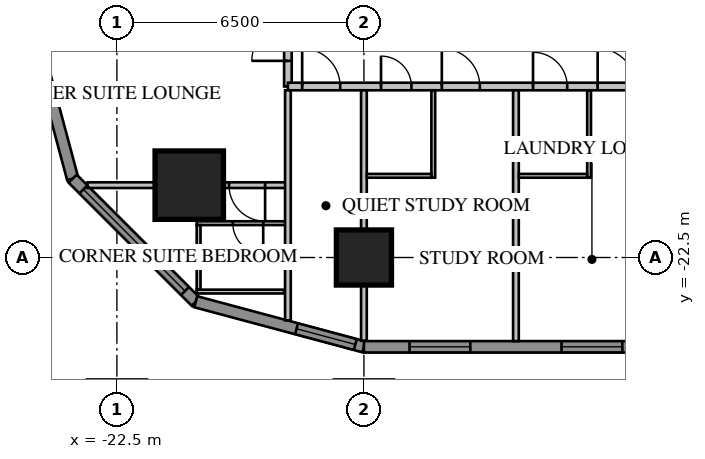
"""IFC4 building model, lengths in metres.
Left out: names, types, materials, properties, quantities, classifications, styles, units other than length and angle.
Written with IfcOpenShell. Run it as: python <this file> out.ifc"""

import sys

from ifc_helpers import new_model, si_unit, direction, frame, frame_2d, origin, origin_2d, place, context, subcontext, project, spatial, rectangle, extrude, element, fill, save


model = new_model("IFC4")
c1 = context("Model", 3, precision=1e-05, world=origin(), true_north=direction((0.0, 1.0)))
c2 = subcontext(c1, "Body", "Model", "MODEL_VIEW")
j1 = project(units=[si_unit("LENGTHUNIT", "METRE"), si_unit("PLANEANGLEUNIT", "RADIAN")], contexts=[c1])
p1 = place(None, origin())
s1 = spatial("IfcSite", under=j1, at=p1, CompositionType="ELEMENT")
p2 = place(p1, origin())
s2 = spatial("IfcBuilding", under=s1, at=p2, CompositionType="ELEMENT")
p3 = place(p2, frame((0.0, 0.0, 50.65)))
s3 = spatial("IfcBuildingStorey", under=s2, at=p3, CompositionType="ELEMENT", Elevation=50.65)
p4 = place(p3, frame((-20.596, -20.596, 0.0), z_axis=(0.0, 0.0, 1.0), x_axis=(1.0, 0.0, 0.0)))
e1 = element("IfcColumn", 1, at=p4, inside=s3, PredefinedType="COLUMN", context=c2, shape_type="SweptSolid", body=[
    extrude(rectangle(XDim=1.8, YDim=1.8, at=origin_2d()), origin(), (0.0, 0.0, 1.0), 3.413),
])
p5 = place(p3, frame((-16.0, -22.5, 0.0), z_axis=(0.0, 0.0, 1.0), x_axis=(1.0, 0.0, 0.0)))
e2 = element("IfcColumn", 2, at=p5, inside=s3, PredefinedType="COLUMN", context=c2, shape_type="SweptSolid", body=[
    extrude(rectangle(XDim=1.45, YDim=1.45, at=origin_2d()), origin(), (0.0, 0.0, 1.0), 3.413),
])
p6 = place(p3, frame((-24.85, -16.0, 0.0), z_axis=(0.0, 0.0, 1.0), x_axis=(0.258839972501, -0.965920218567, 0.0)))
e3 = element("IfcWall", 3, at=p6, inside=s3, PredefinedType="SOLIDWALL", context=c2, shape_type="SweptSolid", body=[
    extrude(rectangle(XDim=4.581, YDim=0.3, at=frame_2d((2.291, 0.0))), origin(), (0.0, 0.0, 1.0), 3.65),
])
p7 = place(p3, frame((-23.664, -20.425, 0.0), z_axis=(0.0, 0.0, 1.0), x_axis=(0.707106781187, -0.707106781187, 0.0)))
e4 = element("IfcWall", 4, at=p7, inside=s3, PredefinedType="SOLIDWALL", context=c2, shape_type="SweptSolid", body=[
    extrude(rectangle(XDim=4.581, YDim=0.3, at=frame_2d((2.291, 0.0))), origin(), (0.0, 0.0, 1.0), 3.65),
])
p8 = place(p7, frame((0.4, 0.0, 0.75)))
e5 = element("IfcOpeningElement", 5, at=p8, cuts=e4, PredefinedType="OPENING", context=c2, shape_type="SweptSolid", body=[
    extrude(rectangle(XDim=3.781, YDim=1.8, at=frame_2d((1.891, 0.9))), frame((0.0, 0.17, 0.0), z_axis=(0.0, -1.0, 0.0), x_axis=(1.0, 0.0, 0.0)), (0.0, 0.0, 1.0), 0.34),
])
p9 = place(p3, frame((-20.425, -23.664, 0.0), z_axis=(0.0, 0.0, 1.0), x_axis=(0.965920218567, -0.258839972501, 0.0)))
e6 = element("IfcWall", 6, at=p9, inside=s3, PredefinedType="SOLIDWALL", context=c2, shape_type="SweptSolid", body=[
    extrude(rectangle(XDim=4.581, YDim=0.3, at=frame_2d((2.291, 0.0))), origin(), (0.0, 0.0, 1.0), 3.65),
])
p10 = place(p9, frame((2.746, 0.0, 0.75)))
e7 = element("IfcOpeningElement", 7, at=p10, cuts=e6, PredefinedType="OPENING", context=c2, shape_type="SweptSolid", body=[
    extrude(rectangle(XDim=1.6, YDim=1.8, at=frame_2d((0.8, 0.9))), frame((0.0, 0.17, 0.0), z_axis=(0.0, -1.0, 0.0), x_axis=(1.0, 0.0, 0.0)), (0.0, 0.0, 1.0), 0.34),
])
p11 = place(p3, frame((-16.0, -24.85, 0.0), z_axis=(0.0, 0.0, 1.0), x_axis=(1.0, 0.0, 0.0)))
e8 = element("IfcWall", 8, at=p11, inside=s3, PredefinedType="SOLIDWALL", context=c2, shape_type="SweptSolid", body=[
    extrude(rectangle(XDim=32.0, YDim=0.3, at=frame_2d((16.0, 0.0))), origin(), (0.0, 0.0, 1.0), 3.65),
])
p12 = place(p11, frame((1.2, 0.0, 0.75)))
e9 = element("IfcOpeningElement", 9, at=p12, cuts=e8, PredefinedType="OPENING", context=c2, shape_type="SweptSolid", body=[
    extrude(rectangle(XDim=1.6, YDim=1.8, at=frame_2d((0.8, 0.9))), frame((0.0, 0.17, 0.0), z_axis=(0.0, -1.0, 0.0), x_axis=(1.0, 0.0, 0.0)), (0.0, 0.0, 1.0), 0.34),
])
p13 = place(p11, frame((5.2, 0.0, 0.75)))
e10 = element("IfcOpeningElement", 10, at=p13, cuts=e8, PredefinedType="OPENING", context=c2, shape_type="SweptSolid", body=[
    extrude(rectangle(XDim=1.6, YDim=1.8, at=frame_2d((0.8, 0.9))), frame((0.0, 0.17, 0.0), z_axis=(0.0, -1.0, 0.0), x_axis=(1.0, 0.0, 0.0)), (0.0, 0.0, 1.0), 0.34),
])
p14 = place(p11, frame((17.2, 0.0, 0.75)))
e11 = element("IfcOpeningElement", 11, at=p14, cuts=e8, PredefinedType="OPENING", context=c2, shape_type="SweptSolid", body=[
    extrude(rectangle(XDim=1.6, YDim=1.8, at=frame_2d((0.8, 0.9))), frame((0.0, 0.17, 0.0), z_axis=(0.0, -1.0, 0.0), x_axis=(1.0, 0.0, 0.0)), (0.0, 0.0, 1.0), 0.34),
])
p15 = place(p11, frame((21.2, 0.0, 0.75)))
e12 = element("IfcOpeningElement", 12, at=p15, cuts=e8, PredefinedType="OPENING", context=c2, shape_type="SweptSolid", body=[
    extrude(rectangle(XDim=1.6, YDim=1.8, at=frame_2d((0.8, 0.9))), frame((0.0, 0.17, 0.0), z_axis=(0.0, -1.0, 0.0), x_axis=(1.0, 0.0, 0.0)), (0.0, 0.0, 1.0), 0.34),
])
p16 = place(p11, frame((25.2, 0.0, 0.75)))
e13 = element("IfcOpeningElement", 13, at=p16, cuts=e8, PredefinedType="OPENING", context=c2, shape_type="SweptSolid", body=[
    extrude(rectangle(XDim=1.6, YDim=1.8, at=frame_2d((0.8, 0.9))), frame((0.0, 0.17, 0.0), z_axis=(0.0, -1.0, 0.0), x_axis=(1.0, 0.0, 0.0)), (0.0, 0.0, 1.0), 0.34),
])
p17 = place(p11, frame((29.2, 0.0, 0.75)))
e14 = element("IfcOpeningElement", 14, at=p17, cuts=e8, PredefinedType="OPENING", context=c2, shape_type="SweptSolid", body=[
    extrude(rectangle(XDim=1.6, YDim=1.8, at=frame_2d((0.8, 0.9))), frame((0.0, 0.17, 0.0), z_axis=(0.0, -1.0, 0.0), x_axis=(1.0, 0.0, 0.0)), (0.0, 0.0, 1.0), 0.34),
])
p18 = place(p11, frame((8.8, 0.0, 0.75)))
e15 = element("IfcOpeningElement", 15, at=p18, cuts=e8, PredefinedType="OPENING", context=c2, shape_type="SweptSolid", body=[
    extrude(rectangle(XDim=2.4, YDim=1.8, at=frame_2d((1.2, 0.9))), frame((0.0, 0.17, 0.0), z_axis=(0.0, -1.0, 0.0), x_axis=(1.0, 0.0, 0.0)), (0.0, 0.0, 1.0), 0.34),
])
p19 = place(p11, frame((13.812, 0.0, 0.0)))
e16 = element("IfcOpeningElement", 16, at=p19, cuts=e8, PredefinedType="OPENING", context=c2, shape_type="SweptSolid", body=[
    extrude(rectangle(XDim=1.0, YDim=2.4, at=frame_2d((0.5, 1.2))), frame((0.0, 0.17, 0.0), z_axis=(0.0, -1.0, 0.0), x_axis=(1.0, 0.0, 0.0)), (0.0, 0.0, 1.0), 0.34),
])
p20 = place(p3, frame((-18.0, 18.0, 0.0), z_axis=(0.0, 0.0, 1.0), x_axis=(0.0, -1.0, 0.0)))
e17 = element("IfcWall", 17, at=p20, inside=s3, PredefinedType="PARTITIONING", context=c2, shape_type="SweptSolid", body=[
    extrude(rectangle(XDim=36.0, YDim=0.2, at=frame_2d((18.0, 0.0))), origin(), (0.0, 0.0, 1.0), 3.65),
])
p21 = place(p20, frame((0.375, 0.0, 0.0)))
e18 = element("IfcOpeningElement", 18, at=p21, cuts=e17, PredefinedType="OPENING", context=c2, shape_type="SweptSolid", body=[
    extrude(rectangle(XDim=1.0, YDim=2.1, at=frame_2d((0.5, 1.05))), frame((0.0, 0.12, 0.0), z_axis=(0.0, -1.0, 0.0), x_axis=(1.0, 0.0, 0.0)), (0.0, 0.0, 1.0), 0.24),
])
p22 = place(p20, frame((2.375, 0.0, 0.0)))
e19 = element("IfcOpeningElement", 19, at=p22, cuts=e17, PredefinedType="OPENING", context=c2, shape_type="SweptSolid", body=[
    extrude(rectangle(XDim=0.95, YDim=2.1, at=frame_2d((0.475, 1.05))), frame((0.0, 0.12, 0.0), z_axis=(0.0, -1.0, 0.0), x_axis=(1.0, 0.0, 0.0)), (0.0, 0.0, 1.0), 0.24),
])
p23 = place(p20, frame((7.95, 0.0, 0.0)))
e20 = element("IfcOpeningElement", 20, at=p23, cuts=e17, PredefinedType="OPENING", context=c2, shape_type="SweptSolid", body=[
    extrude(rectangle(XDim=0.95, YDim=2.1, at=frame_2d((0.475, 1.05))), frame((0.0, 0.12, 0.0), z_axis=(0.0, -1.0, 0.0), x_axis=(1.0, 0.0, 0.0)), (0.0, 0.0, 1.0), 0.24),
])
p24 = place(p20, frame((18.375, 0.0, 0.0)))
e21 = element("IfcOpeningElement", 21, at=p24, cuts=e17, PredefinedType="OPENING", context=c2, shape_type="SweptSolid", body=[
    extrude(rectangle(XDim=0.95, YDim=2.1, at=frame_2d((0.475, 1.05))), frame((0.0, 0.12, 0.0), z_axis=(0.0, -1.0, 0.0), x_axis=(1.0, 0.0, 0.0)), (0.0, 0.0, 1.0), 0.24),
])
p25 = place(p20, frame((23.95, 0.0, 0.0)))
e22 = element("IfcOpeningElement", 22, at=p25, cuts=e17, PredefinedType="OPENING", context=c2, shape_type="SweptSolid", body=[
    extrude(rectangle(XDim=0.95, YDim=2.1, at=frame_2d((0.475, 1.05))), frame((0.0, 0.12, 0.0), z_axis=(0.0, -1.0, 0.0), x_axis=(1.0, 0.0, 0.0)), (0.0, 0.0, 1.0), 0.24),
])
p26 = place(p20, frame((26.375, 0.0, 0.0)))
e23 = element("IfcOpeningElement", 23, at=p26, cuts=e17, PredefinedType="OPENING", context=c2, shape_type="SweptSolid", body=[
    extrude(rectangle(XDim=0.95, YDim=2.1, at=frame_2d((0.475, 1.05))), frame((0.0, 0.12, 0.0), z_axis=(0.0, -1.0, 0.0), x_axis=(1.0, 0.0, 0.0)), (0.0, 0.0, 1.0), 0.24),
])
p27 = place(p20, frame((31.95, 0.0, 0.0)))
e24 = element("IfcOpeningElement", 24, at=p27, cuts=e17, PredefinedType="OPENING", context=c2, shape_type="SweptSolid", body=[
    extrude(rectangle(XDim=0.95, YDim=2.1, at=frame_2d((0.475, 1.05))), frame((0.0, 0.12, 0.0), z_axis=(0.0, -1.0, 0.0), x_axis=(1.0, 0.0, 0.0)), (0.0, 0.0, 1.0), 0.24),
])
p28 = place(p20, frame((34.375, 0.0, 0.0)))
e25 = element("IfcOpeningElement", 25, at=p28, cuts=e17, PredefinedType="OPENING", context=c2, shape_type="SweptSolid", body=[
    extrude(rectangle(XDim=0.95, YDim=2.1, at=frame_2d((0.475, 1.05))), frame((0.0, 0.12, 0.0), z_axis=(0.0, -1.0, 0.0), x_axis=(1.0, 0.0, 0.0)), (0.0, 0.0, 1.0), 0.24),
])
p29 = place(p20, frame((11.2, 0.0, 0.0)))
e26 = element("IfcOpeningElement", 26, at=p29, cuts=e17, PredefinedType="OPENING", context=c2, shape_type="SweptSolid", body=[
    extrude(rectangle(XDim=1.0, YDim=2.1, at=frame_2d((0.5, 1.05))), frame((0.0, 0.12, 0.0), z_axis=(0.0, -1.0, 0.0), x_axis=(1.0, 0.0, 0.0)), (0.0, 0.0, 1.0), 0.24),
])
p30 = place(p3, frame((-18.065, -21.596, 0.0), z_axis=(0.0, 0.0, 1.0), x_axis=(-1.0, 0.0, 0.0)))
e27 = element("IfcWall", 27, at=p30, inside=s3, PredefinedType="PARTITIONING", context=c2, shape_type="SweptSolid", body=[
    extrude(rectangle(XDim=2.335, YDim=0.1, at=frame_2d((1.167, 0.0))), origin(), (0.0, 0.0, 1.0), 3.65),
])
p31 = place(p30, frame((0.585, 0.0, 0.0)))
e28 = element("IfcOpeningElement", 28, at=p31, cuts=e27, PredefinedType="OPENING", context=c2, shape_type="SweptSolid", body=[
    extrude(rectangle(XDim=0.8, YDim=2.1, at=frame_2d((0.4, 1.05))), frame((0.0, 0.07, 0.0), z_axis=(0.0, -1.0, 0.0), x_axis=(1.0, 0.0, 0.0)), (0.0, 0.0, 1.0), 0.14),
])
p32 = place(p3, frame((-20.35, -21.646, 0.0), z_axis=(0.0, 0.0, 1.0), x_axis=(0.0, -1.0, 0.0)))
e29 = element("IfcWall", 29, at=p32, inside=s3, PredefinedType="PARTITIONING", context=c2, shape_type="SweptSolid", body=[
    extrude(rectangle(XDim=1.7, YDim=0.1, at=frame_2d((0.85, 0.0))), origin(), (0.0, 0.0, 1.0), 3.65),
])
p33 = place(p3, frame((-18.1, -23.396, 0.0), z_axis=(0.0, 0.0, 1.0), x_axis=(-1.0, 0.0, 0.0)))
e30 = element("IfcWall", 30, at=p33, inside=s3, PredefinedType="PARTITIONING", context=c2, shape_type="SweptSolid", body=[
    extrude(rectangle(XDim=2.3, YDim=0.1, at=frame_2d((1.15, 0.0))), origin(), (0.0, 0.0, 1.0), 3.65),
])
p34 = place(p3, frame((-18.065, -20.596, 0.0), z_axis=(0.0, 0.0, 1.0), x_axis=(-1.0, 0.0, 0.0)))
e31 = element("IfcWall", 31, at=p34, inside=s3, PredefinedType="PARTITIONING", context=c2, shape_type="SweptSolid", body=[
    extrude(rectangle(XDim=5.209, YDim=0.15, at=frame_2d((2.604, 0.0))), origin(), (0.0, 0.0, 1.0), 3.65),
])
p35 = place(p34, frame((0.535, 0.0, 0.0)))
e32 = element("IfcOpeningElement", 32, at=p35, cuts=e31, PredefinedType="OPENING", context=c2, shape_type="SweptSolid", body=[
    extrude(rectangle(XDim=0.95, YDim=2.1, at=frame_2d((0.475, 1.05))), frame((0.0, 0.095, 0.0), z_axis=(0.0, -1.0, 0.0), x_axis=(1.0, 0.0, 0.0)), (0.0, 0.0, 1.0), 0.19),
])
p36 = place(p3, frame((-18.0, -18.0, 0.0), z_axis=(0.0, 0.0, 1.0), x_axis=(1.0, 0.0, 0.0)))
e33 = element("IfcWall", 33, at=p36, inside=s3, PredefinedType="PARTITIONING", context=c2, shape_type="SweptSolid", body=[
    extrude(rectangle(XDim=36.0, YDim=0.2, at=frame_2d((18.0, 0.0))), origin(), (0.0, 0.0, 1.0), 3.65),
])
p37 = place(p36, frame((0.375, 0.0, 0.0)))
e34 = element("IfcOpeningElement", 34, at=p37, cuts=e33, PredefinedType="OPENING", context=c2, shape_type="SweptSolid", body=[
    extrude(rectangle(XDim=1.0, YDim=2.1, at=frame_2d((0.5, 1.05))), frame((0.0, 0.12, 0.0), z_axis=(0.0, -1.0, 0.0), x_axis=(1.0, 0.0, 0.0)), (0.0, 0.0, 1.0), 0.24),
])
p38 = place(p36, frame((2.45, 0.0, 0.0)))
e35 = element("IfcOpeningElement", 35, at=p38, cuts=e33, PredefinedType="OPENING", context=c2, shape_type="SweptSolid", body=[
    extrude(rectangle(XDim=0.8, YDim=2.1, at=frame_2d((0.4, 1.05))), frame((0.0, 0.12, 0.0), z_axis=(0.0, -1.0, 0.0), x_axis=(1.0, 0.0, 0.0)), (0.0, 0.0, 1.0), 0.24),
])
p39 = place(p36, frame((4.05, 0.0, 0.0)))
e36 = element("IfcOpeningElement", 36, at=p39, cuts=e33, PredefinedType="OPENING", context=c2, shape_type="SweptSolid", body=[
    extrude(rectangle(XDim=1.0, YDim=2.1, at=frame_2d((0.5, 1.05))), frame((0.0, 0.12, 0.0), z_axis=(0.0, -1.0, 0.0), x_axis=(1.0, 0.0, 0.0)), (0.0, 0.0, 1.0), 0.24),
])
p40 = place(p36, frame((6.45, 0.0, 0.0)))
e37 = element("IfcOpeningElement", 37, at=p40, cuts=e33, PredefinedType="OPENING", context=c2, shape_type="SweptSolid", body=[
    extrude(rectangle(XDim=0.9, YDim=2.1, at=frame_2d((0.45, 1.05))), frame((0.0, 0.12, 0.0), z_axis=(0.0, -1.0, 0.0), x_axis=(1.0, 0.0, 0.0)), (0.0, 0.0, 1.0), 0.24),
])
p41 = place(p36, frame((8.15, 0.0, 0.0)))
e38 = element("IfcOpeningElement", 38, at=p41, cuts=e33, PredefinedType="OPENING", context=c2, shape_type="SweptSolid", body=[
    extrude(rectangle(XDim=1.0, YDim=2.1, at=frame_2d((0.5, 1.05))), frame((0.0, 0.12, 0.0), z_axis=(0.0, -1.0, 0.0), x_axis=(1.0, 0.0, 0.0)), (0.0, 0.0, 1.0), 0.24),
])
p42 = place(p36, frame((19.95, 0.0, 0.0)))
e39 = element("IfcOpeningElement", 39, at=p42, cuts=e33, PredefinedType="OPENING", context=c2, shape_type="SweptSolid", body=[
    extrude(rectangle(XDim=0.95, YDim=2.1, at=frame_2d((0.475, 1.05))), frame((0.0, 0.12, 0.0), z_axis=(0.0, -1.0, 0.0), x_axis=(1.0, 0.0, 0.0)), (0.0, 0.0, 1.0), 0.24),
])
p43 = place(p36, frame((23.95, 0.0, 0.0)))
e40 = element("IfcOpeningElement", 40, at=p43, cuts=e33, PredefinedType="OPENING", context=c2, shape_type="SweptSolid", body=[
    extrude(rectangle(XDim=0.95, YDim=2.1, at=frame_2d((0.475, 1.05))), frame((0.0, 0.12, 0.0), z_axis=(0.0, -1.0, 0.0), x_axis=(1.0, 0.0, 0.0)), (0.0, 0.0, 1.0), 0.24),
])
p44 = place(p36, frame((27.95, 0.0, 0.0)))
e41 = element("IfcOpeningElement", 41, at=p44, cuts=e33, PredefinedType="OPENING", context=c2, shape_type="SweptSolid", body=[
    extrude(rectangle(XDim=0.95, YDim=2.1, at=frame_2d((0.475, 1.05))), frame((0.0, 0.12, 0.0), z_axis=(0.0, -1.0, 0.0), x_axis=(1.0, 0.0, 0.0)), (0.0, 0.0, 1.0), 0.24),
])
p45 = place(p36, frame((31.95, 0.0, 0.0)))
e42 = element("IfcOpeningElement", 42, at=p45, cuts=e33, PredefinedType="OPENING", context=c2, shape_type="SweptSolid", body=[
    extrude(rectangle(XDim=0.95, YDim=2.1, at=frame_2d((0.475, 1.05))), frame((0.0, 0.12, 0.0), z_axis=(0.0, -1.0, 0.0), x_axis=(1.0, 0.0, 0.0)), (0.0, 0.0, 1.0), 0.24),
])
p46 = place(p36, frame((34.375, 0.0, 0.0)))
e43 = element("IfcOpeningElement", 43, at=p46, cuts=e33, PredefinedType="OPENING", context=c2, shape_type="SweptSolid", body=[
    extrude(rectangle(XDim=0.95, YDim=2.1, at=frame_2d((0.475, 1.05))), frame((0.0, 0.12, 0.0), z_axis=(0.0, -1.0, 0.0), x_axis=(1.0, 0.0, 0.0)), (0.0, 0.0, 1.0), 0.24),
])
p47 = place(p36, frame((11.2, 0.0, 0.0)))
e44 = element("IfcOpeningElement", 44, at=p47, cuts=e33, PredefinedType="OPENING", context=c2, shape_type="SweptSolid", body=[
    extrude(rectangle(XDim=1.0, YDim=2.1, at=frame_2d((0.5, 1.05))), frame((0.0, 0.12, 0.0), z_axis=(0.0, -1.0, 0.0), x_axis=(1.0, 0.0, 0.0)), (0.0, 0.0, 1.0), 0.24),
])
p48 = place(p3, frame((-18.0, -18.1, 0.0), z_axis=(0.0, 0.0, 1.0), x_axis=(0.0, -1.0, 0.0)))
e45 = element("IfcWall", 45, at=p48, inside=s3, PredefinedType="PARTITIONING", context=c2, shape_type="SweptSolid", body=[
    extrude(rectangle(XDim=6.053, YDim=0.15, at=frame_2d((3.027, 0.0))), origin(), (0.0, 0.0, 1.0), 3.65),
])
p49 = place(p3, frame((-16.0, -18.1, 0.0), z_axis=(0.0, 0.0, 1.0), x_axis=(0.0, -1.0, 0.0)))
e46 = element("IfcWall", 46, at=p49, inside=s3, PredefinedType="PARTITIONING", context=c2, shape_type="SweptSolid", body=[
    extrude(rectangle(XDim=6.589, YDim=0.15, at=frame_2d((3.295, 0.0))), origin(), (0.0, 0.0, 1.0), 3.65),
])
p50 = place(p3, frame((-12.0, -18.1, 0.0), z_axis=(0.0, 0.0, 1.0), x_axis=(0.0, -1.0, 0.0)))
e47 = element("IfcWall", 47, at=p50, inside=s3, PredefinedType="PARTITIONING", context=c2, shape_type="SweptSolid", body=[
    extrude(rectangle(XDim=6.6, YDim=0.15, at=frame_2d((3.3, 0.0))), origin(), (0.0, 0.0, 1.0), 3.65),
])
p51 = place(p3, frame((-14.175, -18.1, 0.0), z_axis=(0.0, 0.0, 1.0), x_axis=(0.0, -1.0, 0.0)))
e48 = element("IfcWall", 48, at=p51, inside=s3, PredefinedType="PARTITIONING", context=c2, shape_type="SweptSolid", body=[
    extrude(rectangle(XDim=2.3, YDim=0.1, at=frame_2d((1.15, 0.0))), origin(), (0.0, 0.0, 1.0), 3.65),
])
p52 = place(p3, frame((-15.925, -20.35, 0.0), z_axis=(0.0, 0.0, 1.0), x_axis=(1.0, 0.0, 0.0)))
e49 = element("IfcWall", 49, at=p52, inside=s3, PredefinedType="PARTITIONING", context=c2, shape_type="SweptSolid", body=[
    extrude(rectangle(XDim=1.7, YDim=0.1, at=frame_2d((0.85, 0.0))), origin(), (0.0, 0.0, 1.0), 3.65),
])
p53 = place(p3, frame((-10.075, -18.1, 0.0), z_axis=(0.0, 0.0, 1.0), x_axis=(0.0, -1.0, 0.0)))
e50 = element("IfcWall", 50, at=p53, inside=s3, PredefinedType="PARTITIONING", context=c2, shape_type="SweptSolid", body=[
    extrude(rectangle(XDim=2.3, YDim=0.1, at=frame_2d((1.15, 0.0))), origin(), (0.0, 0.0, 1.0), 3.65),
])
p54 = place(p3, frame((-11.925, -20.35, 0.0), z_axis=(0.0, 0.0, 1.0), x_axis=(1.0, 0.0, 0.0)))
e51 = element("IfcWall", 51, at=p54, inside=s3, PredefinedType="PARTITIONING", context=c2, shape_type="SweptSolid", body=[
    extrude(rectangle(XDim=1.8, YDim=0.1, at=frame_2d((0.9, 0.0))), origin(), (0.0, 0.0, 1.0), 3.65),
])
p55 = place(p8, origin())
e52 = element("IfcWindow", 52, at=p55, inside=s3, PartitioningType="SINGLE_PANEL", PredefinedType="WINDOW", context=c2, shape_type="SweptSolid", body=[
    extrude(rectangle(XDim=3.781, YDim=1.8, at=frame_2d((1.891, 0.9))), frame((0.0, 0.03, 0.0), z_axis=(0.0, -1.0, 0.0), x_axis=(1.0, 0.0, 0.0)), (0.0, 0.0, 1.0), 0.06),
])
fill(e5, e52)
p56 = place(p10, origin())
e53 = element("IfcWindow", 53, at=p56, inside=s3, PartitioningType="SINGLE_PANEL", PredefinedType="WINDOW", context=c2, shape_type="SweptSolid", body=[
    extrude(rectangle(XDim=1.6, YDim=1.8, at=frame_2d((0.8, 0.9))), frame((0.0, 0.03, 0.0), z_axis=(0.0, -1.0, 0.0), x_axis=(1.0, 0.0, 0.0)), (0.0, 0.0, 1.0), 0.06),
])
fill(e7, e53)
p57 = place(p12, origin())
e54 = element("IfcWindow", 54, at=p57, inside=s3, PartitioningType="SINGLE_PANEL", PredefinedType="WINDOW", context=c2, shape_type="SweptSolid", body=[
    extrude(rectangle(XDim=1.6, YDim=1.8, at=frame_2d((0.8, 0.9))), frame((0.0, 0.03, 0.0), z_axis=(0.0, -1.0, 0.0), x_axis=(1.0, 0.0, 0.0)), (0.0, 0.0, 1.0), 0.06),
])
fill(e9, e54)
p58 = place(p13, origin())
e55 = element("IfcWindow", 55, at=p58, inside=s3, PartitioningType="SINGLE_PANEL", PredefinedType="WINDOW", context=c2, shape_type="SweptSolid", body=[
    extrude(rectangle(XDim=1.6, YDim=1.8, at=frame_2d((0.8, 0.9))), frame((0.0, 0.03, 0.0), z_axis=(0.0, -1.0, 0.0), x_axis=(1.0, 0.0, 0.0)), (0.0, 0.0, 1.0), 0.06),
])
fill(e10, e55)
p59 = place(p28, origin())
e56 = element("IfcDoor", 56, at=p59, inside=s3, OperationType="SINGLE_SWING_RIGHT", PredefinedType="DOOR", context=c2, shape_type="SweptSolid", body=[
    extrude(rectangle(XDim=0.95, YDim=2.1, at=frame_2d((0.475, 1.05))), frame((0.0, 0.025, 0.0), z_axis=(0.0, -1.0, 0.0), x_axis=(1.0, 0.0, 0.0)), (0.0, 0.0, 1.0), 0.05),
])
fill(e25, e56)
p60 = place(p31, origin())
e57 = element("IfcDoor", 57, at=p60, inside=s3, OperationType="SINGLE_SWING_LEFT", PredefinedType="DOOR", context=c2, shape_type="SweptSolid", body=[
    extrude(rectangle(XDim=0.8, YDim=2.1, at=frame_2d((0.4, 1.05))), frame((0.0, 0.025, 0.0), z_axis=(0.0, -1.0, 0.0), x_axis=(1.0, 0.0, 0.0)), (0.0, 0.0, 1.0), 0.05),
])
fill(e28, e57)
p61 = place(p35, origin())
e58 = element("IfcDoor", 58, at=p61, inside=s3, OperationType="SINGLE_SWING_LEFT", PredefinedType="DOOR", context=c2, shape_type="SweptSolid", body=[
    extrude(rectangle(XDim=0.95, YDim=2.1, at=frame_2d((0.475, 1.05))), frame((0.0, 0.025, 0.0), z_axis=(0.0, -1.0, 0.0), x_axis=(1.0, 0.0, 0.0)), (0.0, 0.0, 1.0), 0.05),
])
fill(e32, e58)
p62 = place(p37, origin())
e59 = element("IfcDoor", 59, at=p62, inside=s3, OperationType="SINGLE_SWING_LEFT", PredefinedType="DOOR", context=c2, shape_type="SweptSolid", body=[
    extrude(rectangle(XDim=1.0, YDim=2.1, at=frame_2d((0.5, 1.05))), frame((0.0, 0.025, 0.0), z_axis=(0.0, -1.0, 0.0), x_axis=(1.0, 0.0, 0.0)), (0.0, 0.0, 1.0), 0.05),
])
fill(e34, e59)
p63 = place(p38, origin())
e60 = element("IfcDoor", 60, at=p63, inside=s3, OperationType="SINGLE_SWING_LEFT", PredefinedType="DOOR", context=c2, shape_type="SweptSolid", body=[
    extrude(rectangle(XDim=0.8, YDim=2.1, at=frame_2d((0.4, 1.05))), frame((0.0, 0.025, 0.0), z_axis=(0.0, -1.0, 0.0), x_axis=(1.0, 0.0, 0.0)), (0.0, 0.0, 1.0), 0.05),
])
fill(e35, e60)
p64 = place(p39, origin())
e61 = element("IfcDoor", 61, at=p64, inside=s3, OperationType="SINGLE_SWING_LEFT", PredefinedType="DOOR", context=c2, shape_type="SweptSolid", body=[
    extrude(rectangle(XDim=1.0, YDim=2.1, at=frame_2d((0.5, 1.05))), frame((0.0, 0.025, 0.0), z_axis=(0.0, -1.0, 0.0), x_axis=(1.0, 0.0, 0.0)), (0.0, 0.0, 1.0), 0.05),
])
fill(e36, e61)
p65 = place(p40, origin())
e62 = element("IfcDoor", 62, at=p65, inside=s3, OperationType="SINGLE_SWING_LEFT", PredefinedType="DOOR", context=c2, shape_type="SweptSolid", body=[
    extrude(rectangle(XDim=0.9, YDim=2.1, at=frame_2d((0.45, 1.05))), frame((0.0, 0.025, 0.0), z_axis=(0.0, -1.0, 0.0), x_axis=(1.0, 0.0, 0.0)), (0.0, 0.0, 1.0), 0.05),
])
fill(e37, e62)
p66 = place(p41, origin())
e63 = element("IfcDoor", 63, at=p66, inside=s3, OperationType="SINGLE_SWING_LEFT", PredefinedType="DOOR", context=c2, shape_type="SweptSolid", body=[
    extrude(rectangle(XDim=1.0, YDim=2.1, at=frame_2d((0.5, 1.05))), frame((0.0, 0.025, 0.0), z_axis=(0.0, -1.0, 0.0), x_axis=(1.0, 0.0, 0.0)), (0.0, 0.0, 1.0), 0.05),
])
fill(e38, e63)
save(model, sys.argv[1])
